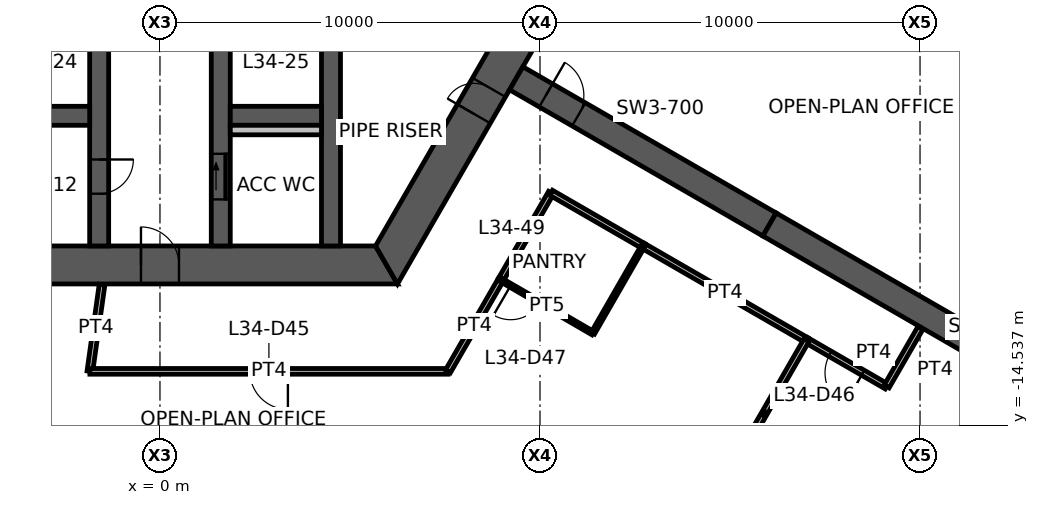
"""IFC4 building model, lengths in metres.
Left out: names, types, materials, properties, quantities, classifications, styles, units other than length and angle.
Written with IfcOpenShell. Run it as: python <this file> out.ifc"""

import sys

from ifc_helpers import new_model, si_unit, direction, frame, frame_2d, origin, place, context, subcontext, project, spatial, polyline, rectangle, outline, extrude, element, fill, save


model = new_model("IFC4")
c1 = context("Model", 3, precision=1e-05, world=origin(), true_north=direction((0.0, 1.0)))
c2 = subcontext(c1, "Body", "Model", "MODEL_VIEW")
j1 = project(units=[si_unit("LENGTHUNIT", "METRE"), si_unit("PLANEANGLEUNIT", "RADIAN")], contexts=[c1])
p1 = place(None, origin())
s1 = spatial("IfcSite", under=j1, at=p1, CompositionType="ELEMENT")
p2 = place(p1, origin())
s2 = spatial("IfcBuilding", under=s1, at=p2, CompositionType="ELEMENT")
p3 = place(p2, frame((0.0, 0.0, 137.0)))
s3 = spatial("IfcBuildingStorey", under=s2, at=p3, CompositionType="ELEMENT", Elevation=137.0)
p4 = place(p3, frame((-5.961, -10.325, 0.0), z_axis=(0.0, 0.0, 1.0), x_axis=(1.0, 0.0, 0.0)))
e1 = element("IfcWall", 1, at=p4, inside=s3, PredefinedType="SHEAR", context=c2, shape_type="SweptSolid", body=[
    extrude(outline(polyline([(-0.289, -0.5), (5.461, -0.5), (6.461, -0.5), (12.211, -0.5), (11.634, 0.5), (6.461, 0.5), (5.461, 0.5), (0.289, 0.5), (-0.289, -0.5)])), origin(), (0.0, 0.0, 1.0), 3.9),
])
p5 = place(p4, frame((5.461, 0.0, 0.0)))
e2 = element("IfcOpeningElement", 2, at=p5, cuts=e1, PredefinedType="OPENING", context=c2, shape_type="SweptSolid", body=[
    extrude(rectangle(XDim=1.0, YDim=2.1, at=frame_2d((0.5, 1.05))), frame((0.0, 0.51, 0.0), z_axis=(0.0, -1.0, 0.0), x_axis=(1.0, 0.0, 0.0)), (0.0, 0.0, 1.0), 1.02),
])
p6 = place(p3, frame((5.961, -10.325, 0.0), z_axis=(0.0, 0.0, 1.0), x_axis=(0.500004296715, 0.866022923061, 0.0)))
e3 = element("IfcWall", 3, at=p6, inside=s3, PredefinedType="SHEAR", context=c2, shape_type="SweptSolid", body=[
    extrude(outline(polyline([(-0.289, -0.5), (4.594, -0.5), (5.394, -0.5), (12.211, -0.5), (11.634, 0.5), (5.394, 0.5), (4.594, 0.5), (0.289, 0.5), (-0.289, -0.5)])), origin(), (0.0, 0.0, 1.0), 3.9),
])
p7 = place(p6, frame((4.594, 0.0, 0.0)))
e4 = element("IfcOpeningElement", 4, at=p7, cuts=e3, PredefinedType="OPENING", context=c2, shape_type="SweptSolid", body=[
    extrude(rectangle(XDim=0.8, YDim=2.1, at=frame_2d((0.4, 1.05))), frame((0.0, 0.51, 0.0), z_axis=(0.0, -1.0, 0.0), x_axis=(1.0, 0.0, 0.0)), (0.0, 0.0, 1.0), 1.02),
])
p8 = place(p3, frame((9.375, -5.413, 0.0), z_axis=(0.0, 0.0, 1.0), x_axis=(0.866032377459, -0.499987921047, 0.0)))
e5 = element("IfcWall", 5, at=p8, inside=s3, PredefinedType="SHEAR", context=c2, shape_type="SweptSolid", body=[
    extrude(rectangle(XDim=7.696, YDim=0.7, at=frame_2d((3.848, 0.0))), origin(), (0.0, 0.0, 1.0), 3.9),
])
p9 = place(p8, frame((0.9, 0.0, 0.0)))
e6 = element("IfcOpeningElement", 6, at=p9, cuts=e5, PredefinedType="OPENING", context=c2, shape_type="SweptSolid", body=[
    extrude(rectangle(XDim=1.0, YDim=2.1, at=frame_2d((0.5, 1.05))), frame((0.0, 0.36, 0.0), z_axis=(0.0, -1.0, 0.0), x_axis=(1.0, 0.0, 0.0)), (0.0, 0.0, 1.0), 0.72),
])
p10 = place(p3, frame((16.039, -9.26, 0.0), z_axis=(0.0, 0.0, 1.0), x_axis=(0.866024837091, -0.50000098154, 0.0)))
e7 = element("IfcWall", 7, at=p10, inside=s3, PredefinedType="SHEAR", context=c2, shape_type="SweptSolid", body=[
    extrude(rectangle(XDim=13.0, YDim=0.7, at=frame_2d((6.5, 0.0))), origin(), (0.0, 0.0, 1.0), 3.9),
])
p11 = place(p3, frame((-1.6, -3.85, 0.0), z_axis=(0.0, 0.0, 1.0), x_axis=(0.0, -1.0, 0.0)))
e8 = element("IfcWall", 8, at=p11, inside=s3, PredefinedType="SHEAR", context=c2, shape_type="SweptSolid", body=[
    extrude(rectangle(XDim=5.975, YDim=0.5, at=frame_2d((2.987, 0.0))), origin(), (0.0, 0.0, 1.0), 3.9),
])
p12 = place(p11, frame((3.7, 0.0, 0.0)))
e9 = element("IfcOpeningElement", 9, at=p12, cuts=e8, PredefinedType="OPENING", context=c2, shape_type="SweptSolid", body=[
    extrude(rectangle(XDim=0.9, YDim=2.1, at=frame_2d((0.45, 1.05))), frame((0.0, 0.26, 0.0), z_axis=(0.0, -1.0, 0.0), x_axis=(1.0, 0.0, 0.0)), (0.0, 0.0, 1.0), 0.52),
])
p13 = place(p3, frame((1.6, -3.85, 0.0), z_axis=(0.0, 0.0, 1.0), x_axis=(0.0, -1.0, 0.0)))
e10 = element("IfcWall", 10, at=p13, inside=s3, PredefinedType="SHEAR", context=c2, shape_type="SweptSolid", body=[
    extrude(rectangle(XDim=5.975, YDim=0.5, at=frame_2d((2.987, 0.0))), origin(), (0.0, 0.0, 1.0), 3.9),
])
p14 = place(p13, frame((3.55, 0.0, 0.0)))
e11 = element("IfcOpeningElement", 11, at=p14, cuts=e10, PredefinedType="OPENING", context=c2, shape_type="SweptSolid", body=[
    extrude(rectangle(XDim=1.2, YDim=2.1, at=frame_2d((0.6, 1.05))), frame((0.0, 0.26, 0.0), z_axis=(0.0, -1.0, 0.0), x_axis=(1.0, 0.0, 0.0)), (0.0, 0.0, 1.0), 0.52),
])
p15 = place(p3, frame((4.5, -3.85, 0.0), z_axis=(0.0, 0.0, 1.0), x_axis=(0.0, -1.0, 0.0)))
e12 = element("IfcWall", 12, at=p15, inside=s3, PredefinedType="SHEAR", context=c2, shape_type="SweptSolid", body=[
    extrude(rectangle(XDim=5.975, YDim=0.5, at=frame_2d((2.987, 0.0))), origin(), (0.0, 0.0, 1.0), 3.9),
])
for number, where, z_axis, x_axis in (
    (13, (-4.25, -6.4, 0.0), (0.0, 0.0, 1.0), (1.0, 0.0, 0.0)),
    (14, (1.85, -6.4, 0.0), (0.0, 0.0, 1.0), (1.0, 0.0, 0.0)),
):
    element("IfcWall", number, at=place(p3, frame(where, z_axis=z_axis, x_axis=x_axis)), inside=s3, PredefinedType="SHEAR", context=c2, shape_type="SweptSolid", body=[
        extrude(rectangle(XDim=2.4, YDim=0.5, at=frame_2d((1.2, 0.0))), origin(), (0.0, 0.0, 1.0), 3.9),
    ])
p16 = place(p3, frame((1.85, -6.775, 0.0), z_axis=(0.0, 0.0, 1.0), x_axis=(1.0, 0.0, 0.0)))
e15 = element("IfcWall", 15, at=p16, inside=s3, PredefinedType="PLUMBINGWALL", context=c2, shape_type="SweptSolid", body=[
    extrude(rectangle(XDim=2.4, YDim=0.25, at=frame_2d((1.2, 0.0))), origin(), (0.0, 0.0, 1.0), 3.9),
])
p17 = place(p3, frame((10.292, -8.425, 0.0), z_axis=(0.0, 0.0, 1.0), x_axis=(-0.499966561876, -0.866044708433, 0.0)))
e16 = element("IfcWall", 16, at=p17, inside=s3, PredefinedType="PARTITIONING", context=c2, shape_type="SweptSolid", body=[
    extrude(rectangle(XDim=2.655, YDim=0.15, at=frame_2d((1.328, 0.0))), origin(), (0.0, 0.0, 1.0), 2.95),
])
p18 = place(p3, frame((12.721, -9.827, 0.0), z_axis=(0.0, 0.0, 1.0), x_axis=(-0.866049342339, 0.499958534914, 0.0)))
e17 = element("IfcWall", 17, at=p18, inside=s3, PredefinedType="PARTITIONING", context=c2, shape_type="SweptSolid", body=[
    extrude(rectangle(XDim=2.805, YDim=0.15, at=frame_2d((1.402, 0.0))), origin(), (0.0, 0.0, 1.0), 2.95),
])
p19 = place(p3, frame((-1.844, -13.125, 0.0), z_axis=(0.0, 0.0, 1.0), x_axis=(0.139119980631, 0.990275532864, 0.0)))
e18 = element("IfcWall", 18, at=p19, inside=s3, PredefinedType="PARTITIONING", context=c2, shape_type="SweptSolid", body=[
    extrude(rectangle(XDim=2.302, YDim=0.15, at=frame_2d((1.151, 0.0))), origin(), (0.0, 0.0, 1.0), 2.95),
])
p20 = place(p3, frame((7.578, -13.125, 0.0), z_axis=(0.0, 0.0, 1.0), x_axis=(-1.0, 0.0, 0.0)))
e19 = element("IfcWall", 19, at=p20, inside=s3, PredefinedType="PARTITIONING", context=c2, shape_type="SweptSolid", body=[
    extrude(rectangle(XDim=9.422, YDim=0.15, at=frame_2d((4.711, 0.0))), origin(), (0.0, 0.0, 1.0), 2.95),
])
p21 = place(p20, frame((4.211, 0.0, 0.0)))
e20 = element("IfcOpeningElement", 20, at=p21, cuts=e19, PredefinedType="OPENING", context=c2, shape_type="SweptSolid", body=[
    extrude(rectangle(XDim=1.0, YDim=2.1, at=frame_2d((0.5, 1.05))), frame((0.0, 0.085, 0.0), z_axis=(0.0, -1.0, 0.0), x_axis=(1.0, 0.0, 0.0)), (0.0, 0.0, 1.0), 0.17),
])
p22 = place(p3, frame((8.969, -10.716, 0.0), z_axis=(0.0, 0.0, 1.0), x_axis=(-0.500008568482, -0.866020456713, 0.0)))
e21 = element("IfcWall", 21, at=p22, inside=s3, PredefinedType="PARTITIONING", context=c2, shape_type="SweptSolid", body=[
    extrude(rectangle(XDim=2.782, YDim=0.15, at=frame_2d((1.391, 0.0))), origin(), (0.0, 0.0, 1.0), 2.95),
])
p23 = place(p3, frame((17.021, -12.31, 0.0), z_axis=(0.0, 0.0, 1.0), x_axis=(-0.866018071205, 0.500012700186, 0.0)))
e22 = element("IfcWall", 22, at=p23, inside=s3, PredefinedType="PARTITIONING", context=c2, shape_type="SweptSolid", body=[
    extrude(rectangle(XDim=4.975, YDim=0.15, at=frame_2d((2.488, 0.0))), origin(), (0.0, 0.0, 1.0), 2.95),
])
p24 = place(p3, frame((19.121, -13.522, 0.0), z_axis=(0.0, 0.0, 1.0), x_axis=(-0.866000196749, 0.500043657324, 0.0)))
e23 = element("IfcWall", 23, at=p24, inside=s3, PredefinedType="PARTITIONING", context=c2, shape_type="SweptSolid", body=[
    extrude(rectangle(XDim=2.434, YDim=0.15, at=frame_2d((1.217, 0.0))), origin(), (0.0, 0.0, 1.0), 2.95),
])
p25 = place(p24, frame((0.717, 0.0, 0.0)))
e24 = element("IfcOpeningElement", 24, at=p25, cuts=e23, PredefinedType="OPENING", context=c2, shape_type="SweptSolid", body=[
    extrude(rectangle(XDim=1.0, YDim=2.1, at=frame_2d((0.5, 1.05))), frame((0.0, 0.085, 0.0), z_axis=(0.0, -1.0, 0.0), x_axis=(1.0, 0.0, 0.0)), (0.0, 0.0, 1.0), 0.17),
])
p26 = place(p3, frame((20.011, -11.981, 0.0), z_axis=(0.0, 0.0, 1.0), x_axis=(-0.500062787734, -0.865989150234, 0.0)))
e25 = element("IfcWall", 25, at=p26, inside=s3, PredefinedType="PARTITIONING", context=c2, shape_type="SweptSolid", body=[
    extrude(rectangle(XDim=1.78, YDim=0.15, at=frame_2d((0.89, 0.0))), origin(), (0.0, 0.0, 1.0), 2.95),
])
p27 = place(p3, frame((11.392, -12.119, 0.0), z_axis=(0.0, 0.0, 1.0), x_axis=(-0.865255114713, 0.501331812737, 0.0)))
e26 = element("IfcWall", 26, at=p27, inside=s3, PredefinedType="PARTITIONING", context=c2, shape_type="SweptSolid", body=[
    extrude(rectangle(XDim=2.8, YDim=0.1, at=frame_2d((1.4, 0.0))), origin(), (0.0, 0.0, 1.0), 2.95),
])
p28 = place(p27, frame((1.6, 0.0, 0.0)))
e27 = element("IfcOpeningElement", 27, at=p28, cuts=e26, PredefinedType="OPENING", context=c2, shape_type="SweptSolid", body=[
    extrude(rectangle(XDim=0.9, YDim=2.1, at=frame_2d((0.45, 1.05))), frame((0.0, 0.06, 0.0), z_axis=(0.0, -1.0, 0.0), x_axis=(1.0, 0.0, 0.0)), (0.0, 0.0, 1.0), 0.12),
])
p29 = place(p3, frame((12.713, -9.822, 0.0), z_axis=(0.0, 0.0, 1.0), x_axis=(-0.49852824611, -0.866873455488, 0.0)))
e28 = element("IfcWall", 28, at=p29, inside=s3, PredefinedType="PARTITIONING", context=c2, shape_type="SweptSolid", body=[
    extrude(rectangle(XDim=2.65, YDim=0.1, at=frame_2d((1.325, 0.0))), origin(), (0.0, 0.0, 1.0), 2.95),
])
p30 = place(p3, frame((17.013, -12.305, 0.0), z_axis=(0.0, 0.0, 1.0), x_axis=(-0.499081704511, -0.866554933182, 0.0)))
e29 = element("IfcWall", 29, at=p30, inside=s3, PredefinedType="PARTITIONING", context=c2, shape_type="SweptSolid", body=[
    extrude(rectangle(XDim=4.454, YDim=0.15, at=frame_2d((2.227, 0.0))), origin(), (0.0, 0.0, 1.0), 2.95),
])
p31 = place(p5, origin())
e30 = element("IfcDoor", 30, at=p31, inside=s3, OperationType="SINGLE_SWING_LEFT", PredefinedType="DOOR", context=c2, shape_type="SweptSolid", body=[
    extrude(rectangle(XDim=1.0, YDim=2.1, at=frame_2d((0.5, 1.05))), frame((0.0, 0.025, 0.0), z_axis=(0.0, -1.0, 0.0), x_axis=(1.0, 0.0, 0.0)), (0.0, 0.0, 1.0), 0.05),
])
fill(e2, e30)
p32 = place(p7, origin())
e31 = element("IfcDoor", 31, at=p32, inside=s3, OperationType="SINGLE_SWING_LEFT", PredefinedType="DOOR", context=c2, shape_type="SweptSolid", body=[
    extrude(rectangle(XDim=0.8, YDim=2.1, at=frame_2d((0.4, 1.05))), frame((0.0, 0.025, 0.0), z_axis=(0.0, -1.0, 0.0), x_axis=(1.0, 0.0, 0.0)), (0.0, 0.0, 1.0), 0.05),
])
fill(e4, e31)
p33 = place(p14, origin())
e32 = element("IfcDoor", 32, at=p33, inside=s3, OperationType="SLIDING_TO_LEFT", PredefinedType="DOOR", context=c2, shape_type="SweptSolid", body=[
    extrude(rectangle(XDim=1.2, YDim=2.1, at=frame_2d((0.6, 1.05))), frame((0.0, 0.025, 0.0), z_axis=(0.0, -1.0, 0.0), x_axis=(1.0, 0.0, 0.0)), (0.0, 0.0, 1.0), 0.05),
])
fill(e11, e32)
p34 = place(p12, origin())
e33 = element("IfcDoor", 33, at=p34, inside=s3, OperationType="SINGLE_SWING_LEFT", PredefinedType="DOOR", context=c2, shape_type="SweptSolid", body=[
    extrude(rectangle(XDim=0.9, YDim=2.1, at=frame_2d((0.45, 1.05))), frame((0.0, 0.025, 0.0), z_axis=(0.0, -1.0, 0.0), x_axis=(1.0, 0.0, 0.0)), (0.0, 0.0, 1.0), 0.05),
])
fill(e9, e33)
p35 = place(p9, origin())
e34 = element("IfcDoor", 34, at=p35, inside=s3, OperationType="SINGLE_SWING_LEFT", PredefinedType="DOOR", context=c2, shape_type="SweptSolid", body=[
    extrude(rectangle(XDim=1.0, YDim=2.1, at=frame_2d((0.5, 1.05))), frame((0.0, 0.025, 0.0), z_axis=(0.0, -1.0, 0.0), x_axis=(1.0, 0.0, 0.0)), (0.0, 0.0, 1.0), 0.05),
])
fill(e6, e34)
p36 = place(p21, origin())
e35 = element("IfcDoor", 35, at=p36, inside=s3, OperationType="SINGLE_SWING_LEFT", PredefinedType="DOOR", context=c2, shape_type="SweptSolid", body=[
    extrude(rectangle(XDim=1.0, YDim=2.1, at=frame_2d((0.5, 1.05))), frame((0.0, 0.025, 0.0), z_axis=(0.0, -1.0, 0.0), x_axis=(1.0, 0.0, 0.0)), (0.0, 0.0, 1.0), 0.05),
])
fill(e20, e35)
p37 = place(p25, origin())
e36 = element("IfcDoor", 36, at=p37, inside=s3, OperationType="SINGLE_SWING_LEFT", PredefinedType="DOOR", context=c2, shape_type="SweptSolid", body=[
    extrude(rectangle(XDim=1.0, YDim=2.1, at=frame_2d((0.5, 1.05))), frame((0.0, 0.025, 0.0), z_axis=(0.0, -1.0, 0.0), x_axis=(1.0, 0.0, 0.0)), (0.0, 0.0, 1.0), 0.05),
])
fill(e24, e36)
p38 = place(p28, origin())
e37 = element("IfcDoor", 37, at=p38, inside=s3, OperationType="SINGLE_SWING_RIGHT", PredefinedType="DOOR", context=c2, shape_type="SweptSolid", body=[
    extrude(rectangle(XDim=0.9, YDim=2.1, at=frame_2d((0.45, 1.05))), frame((0.0, 0.025, 0.0), z_axis=(0.0, -1.0, 0.0), x_axis=(1.0, 0.0, 0.0)), (0.0, 0.0, 1.0), 0.05),
])
fill(e27, e37)
save(model, sys.argv[1])
